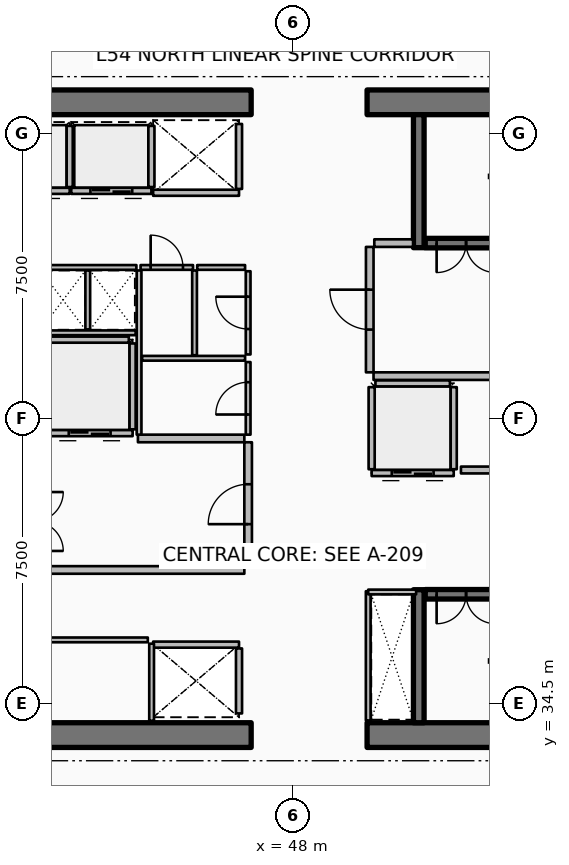
"""IFC4 building model, lengths in metres.
Left out: names, types, materials, properties, quantities, classifications, styles, units other than length and angle.
Written with IfcOpenShell. Run it as: python <this file> out.ifc"""

import sys

from ifc_helpers import new_model, si_unit, direction, frame, frame_2d, origin, place, context, subcontext, project, spatial, rectangle, extrude, element, fill, save


model = new_model("IFC4")
c1 = context("Model", 3, precision=1e-05, world=origin(), true_north=direction((0.0, 1.0)))
c2 = subcontext(c1, "Body", "Model", "MODEL_VIEW")
j1 = project(units=[si_unit("LENGTHUNIT", "METRE"), si_unit("PLANEANGLEUNIT", "RADIAN")], contexts=[c1])
p1 = place(None, origin())
s1 = spatial("IfcSite", under=j1, at=p1, CompositionType="ELEMENT")
p2 = place(p1, origin())
s2 = spatial("IfcBuilding", under=s1, at=p2, CompositionType="ELEMENT")
p3 = place(p2, frame((0.0, 0.0, 214.05)))
s3 = spatial("IfcBuildingStorey", under=s2, at=p3, CompositionType="ELEMENT", Elevation=214.05)
for number, where, z_axis, x_axis in (
    (1, (37.15, 33.675, 0.0), (0.0, 0.0, 1.0), (1.0, 0.0, 0.0)),
    (2, (49.95, 33.675, 0.0), (0.0, 0.0, 1.0), (1.0, 0.0, 0.0)),
    (3, (37.15, 50.325, 0.0), (0.0, 0.0, 1.0), (1.0, 0.0, 0.0)),
    (4, (49.95, 50.325, 0.0), (0.0, 0.0, 1.0), (1.0, 0.0, 0.0)),
):
    element("IfcWall", number, at=place(p3, frame(where, z_axis=z_axis, x_axis=x_axis)), inside=s3, PredefinedType="SHEAR", context=c2, shape_type="SweptSolid", body=[
        extrude(rectangle(XDim=9.75, YDim=0.65, at=frame_2d((4.875, 0.0))), origin(), (0.0, 0.0, 1.0), 3.75),
    ])
for number, where, z_axis, x_axis in (
    (5, (51.31, 46.5, 0.0), (0.0, 0.0, 1.0), (0.0, 1.0, 0.0)),
    (6, (51.31, 34.0, 0.0), (0.0, 0.0, 1.0), (0.0, 1.0, 0.0)),
):
    element("IfcWall", number, at=place(p3, frame(where, z_axis=z_axis, x_axis=x_axis)), inside=s3, PredefinedType="SHEAR", context=c2, shape_type="SweptSolid", body=[
        extrude(rectangle(XDim=3.5, YDim=0.28, at=frame_2d((1.75, 0.0))), origin(), (0.0, 0.0, 1.0), 3.75),
    ])
p4 = place(p3, frame((51.48, 46.62, 0.0), z_axis=(0.0, 0.0, 1.0), x_axis=(1.0, 0.0, 0.0)))
e7 = element("IfcWall", 7, at=p4, inside=s3, PredefinedType="SOLIDWALL", context=c2, shape_type="SweptSolid", body=[
    extrude(rectangle(XDim=7.54, YDim=0.25, at=frame_2d((3.77, 0.0))), origin(), (0.0, 0.0, 1.0), 3.5),
])
p5 = place(p4, frame((0.3, 0.0, 0.0)))
e8 = element("IfcOpeningElement", 8, at=p5, cuts=e7, PredefinedType="OPENING", context=c2, shape_type="SweptSolid", body=[
    extrude(rectangle(XDim=1.55, YDim=2.15, at=frame_2d((0.775, 1.075))), frame((0.0, 0.135, 0.0), z_axis=(0.0, -1.0, 0.0), x_axis=(1.0, 0.0, 0.0)), (0.0, 0.0, 1.0), 0.27),
])
p6 = place(p3, frame((51.48, 37.38, 0.0), z_axis=(0.0, 0.0, 1.0), x_axis=(1.0, 0.0, 0.0)))
e9 = element("IfcWall", 9, at=p6, inside=s3, PredefinedType="SOLIDWALL", context=c2, shape_type="SweptSolid", body=[
    extrude(rectangle(XDim=7.54, YDim=0.25, at=frame_2d((3.77, 0.0))), origin(), (0.0, 0.0, 1.0), 3.5),
])
p7 = place(p6, frame((0.3, 0.0, 0.0)))
e10 = element("IfcOpeningElement", 10, at=p7, cuts=e9, PredefinedType="OPENING", context=c2, shape_type="SweptSolid", body=[
    extrude(rectangle(XDim=1.55, YDim=2.15, at=frame_2d((0.775, 1.075))), frame((0.0, 0.135, 0.0), z_axis=(0.0, -1.0, 0.0), x_axis=(1.0, 0.0, 0.0)), (0.0, 0.0, 1.0), 0.27),
])
p8 = place(p3, frame((42.125, 47.995, 0.0), z_axis=(0.0, 0.0, 1.0), x_axis=(-1.0, 0.0, 0.0)))
e11 = element("IfcWall", 11, at=p8, inside=s3, PredefinedType="PARTITIONING", context=c2, shape_type="SweptSolid", body=[
    extrude(rectangle(XDim=2.11, YDim=0.16, at=frame_2d((1.055, 0.0))), origin(), (0.0, 0.0, 1.0), 3.5),
])
p9 = place(p8, frame((0.505, 0.0, 0.0)))
e12 = element("IfcOpeningElement", 12, at=p9, cuts=e11, PredefinedType="OPENING", context=c2, shape_type="SweptSolid", body=[
    extrude(rectangle(XDim=1.1, YDim=2.1, at=frame_2d((0.55, 1.05))), frame((0.0, 0.09, 0.0), z_axis=(0.0, -1.0, 0.0), x_axis=(1.0, 0.0, 0.0)), (0.0, 0.0, 1.0), 0.18),
])
p10 = place(p3, frame((42.125, 48.095, 0.0), z_axis=(0.0, 0.0, 1.0), x_axis=(0.0, 1.0, 0.0)))
e13 = element("IfcWall", 13, at=p10, inside=s3, PredefinedType="PARTITIONING", context=c2, shape_type="SweptSolid", body=[
    extrude(rectangle(XDim=1.61, YDim=0.16, at=frame_2d((0.805, 0.0))), origin(), (0.0, 0.0, 1.0), 3.5),
])
p11 = place(p3, frame((44.275, 47.995, 0.0), z_axis=(0.0, 0.0, 1.0), x_axis=(-1.0, 0.0, 0.0)))
e14 = element("IfcWall", 14, at=p11, inside=s3, PredefinedType="PARTITIONING", context=c2, shape_type="SweptSolid", body=[
    extrude(rectangle(XDim=2.11, YDim=0.16, at=frame_2d((1.055, 0.0))), origin(), (0.0, 0.0, 1.0), 3.5),
])
p12 = place(p11, frame((0.505, 0.0, 0.0)))
e15 = element("IfcOpeningElement", 15, at=p12, cuts=e14, PredefinedType="OPENING", context=c2, shape_type="SweptSolid", body=[
    extrude(rectangle(XDim=1.1, YDim=2.1, at=frame_2d((0.55, 1.05))), frame((0.0, 0.09, 0.0), z_axis=(0.0, -1.0, 0.0), x_axis=(1.0, 0.0, 0.0)), (0.0, 0.0, 1.0), 0.18),
])
p13 = place(p3, frame((44.275, 48.095, 0.0), z_axis=(0.0, 0.0, 1.0), x_axis=(0.0, 1.0, 0.0)))
e16 = element("IfcWall", 16, at=p13, inside=s3, PredefinedType="PARTITIONING", context=c2, shape_type="SweptSolid", body=[
    extrude(rectangle(XDim=1.61, YDim=0.16, at=frame_2d((0.805, 0.0))), origin(), (0.0, 0.0, 1.0), 3.5),
])
p14 = place(p3, frame((46.58, 47.945, 0.0), z_axis=(0.0, 0.0, 1.0), x_axis=(-1.0, 0.0, 0.0)))
e17 = element("IfcWall", 17, at=p14, inside=s3, PredefinedType="PARTITIONING", context=c2, shape_type="SweptSolid", body=[
    extrude(rectangle(XDim=2.26, YDim=0.16, at=frame_2d((1.13, 0.0))), origin(), (0.0, 0.0, 1.0), 3.5),
])
p15 = place(p3, frame((46.58, 48.045, 0.0), z_axis=(0.0, 0.0, 1.0), x_axis=(0.0, 1.0, 0.0)))
e18 = element("IfcWall", 18, at=p15, inside=s3, PredefinedType="PARTITIONING", context=c2, shape_type="SweptSolid", body=[
    extrude(rectangle(XDim=1.71, YDim=0.16, at=frame_2d((0.855, 0.0))), origin(), (0.0, 0.0, 1.0), 3.5),
])
p16 = place(p3, frame((44.32, 36.055, 0.0), z_axis=(0.0, 0.0, 1.0), x_axis=(1.0, 0.0, 0.0)))
e19 = element("IfcWall", 19, at=p16, inside=s3, PredefinedType="PARTITIONING", context=c2, shape_type="SweptSolid", body=[
    extrude(rectangle(XDim=2.26, YDim=0.16, at=frame_2d((1.13, 0.0))), origin(), (0.0, 0.0, 1.0), 3.5),
])
p17 = place(p3, frame((46.58, 34.245, 0.0), z_axis=(0.0, 0.0, 1.0), x_axis=(0.0, 1.0, 0.0)))
e20 = element("IfcWall", 20, at=p17, inside=s3, PredefinedType="PARTITIONING", context=c2, shape_type="SweptSolid", body=[
    extrude(rectangle(XDim=1.71, YDim=0.16, at=frame_2d((0.855, 0.0))), origin(), (0.0, 0.0, 1.0), 3.5),
])
p18 = place(p3, frame((43.78, 41.62, 0.0), z_axis=(0.0, 0.0, 1.0), x_axis=(-1.0, 0.0, 0.0)))
e21 = element("IfcWall", 21, at=p18, inside=s3, PredefinedType="PARTITIONING", context=c2, shape_type="SweptSolid", body=[
    extrude(rectangle(XDim=2.26, YDim=0.16, at=frame_2d((1.13, 0.0))), origin(), (0.0, 0.0, 1.0), 3.5),
])
p19 = place(p18, frame((0.58, 0.0, 0.0)))
e22 = element("IfcOpeningElement", 22, at=p19, cuts=e21, PredefinedType="OPENING", context=c2, shape_type="SweptSolid", body=[
    extrude(rectangle(XDim=1.1, YDim=2.1, at=frame_2d((0.55, 1.05))), frame((0.0, 0.09, 0.0), z_axis=(0.0, -1.0, 0.0), x_axis=(1.0, 0.0, 0.0)), (0.0, 0.0, 1.0), 0.18),
])
p20 = place(p3, frame((43.78, 41.72, 0.0), z_axis=(0.0, 0.0, 1.0), x_axis=(0.0, 1.0, 0.0)))
e23 = element("IfcWall", 23, at=p20, inside=s3, PredefinedType="PARTITIONING", context=c2, shape_type="SweptSolid", body=[
    extrude(rectangle(XDim=2.26, YDim=0.16, at=frame_2d((1.13, 0.0))), origin(), (0.0, 0.0, 1.0), 3.5),
])
p21 = place(p3, frame((41.62, 44.08, 0.0), z_axis=(0.0, 0.0, 1.0), x_axis=(1.0, 0.0, 0.0)))
e24 = element("IfcWall", 24, at=p21, inside=s3, PredefinedType="PARTITIONING", context=c2, shape_type="SweptSolid", body=[
    extrude(rectangle(XDim=2.06, YDim=0.16, at=frame_2d((1.03, 0.0))), origin(), (0.0, 0.0, 1.0), 3.5),
])
p22 = place(p3, frame((52.23, 40.57, 0.0), z_axis=(0.0, 0.0, 1.0), x_axis=(-1.0, 0.0, 0.0)))
e25 = element("IfcWall", 25, at=p22, inside=s3, PredefinedType="PARTITIONING", context=c2, shape_type="SweptSolid", body=[
    extrude(rectangle(XDim=2.16, YDim=0.16, at=frame_2d((1.08, 0.0))), origin(), (0.0, 0.0, 1.0), 3.5),
])
p23 = place(p22, frame((0.53, 0.0, 0.0)))
e26 = element("IfcOpeningElement", 26, at=p23, cuts=e25, PredefinedType="OPENING", context=c2, shape_type="SweptSolid", body=[
    extrude(rectangle(XDim=1.1, YDim=2.1, at=frame_2d((0.55, 1.05))), frame((0.0, 0.09, 0.0), z_axis=(0.0, -1.0, 0.0), x_axis=(1.0, 0.0, 0.0)), (0.0, 0.0, 1.0), 0.18),
])
for number, where, z_axis, x_axis in (
    (27, (52.23, 40.67, 0.0), (0.0, 0.0, 1.0), (0.0, 1.0, 0.0)),
    (28, (50.07, 40.67, 0.0), (0.0, 0.0, 1.0), (0.0, 1.0, 0.0)),
):
    element("IfcWall", number, at=place(p3, frame(where, z_axis=z_axis, x_axis=x_axis)), inside=s3, PredefinedType="PARTITIONING", context=c2, shape_type="SweptSolid", body=[
        extrude(rectangle(XDim=2.16, YDim=0.16, at=frame_2d((1.08, 0.0))), origin(), (0.0, 0.0, 1.0), 3.5),
    ])
p24 = place(p3, frame((50.17, 42.93, 0.0), z_axis=(0.0, 0.0, 1.0), x_axis=(1.0, 0.0, 0.0)))
e29 = element("IfcWall", 29, at=p24, inside=s3, PredefinedType="PARTITIONING", context=c2, shape_type="SweptSolid", body=[
    extrude(rectangle(XDim=1.96, YDim=0.16, at=frame_2d((0.98, 0.0))), origin(), (0.0, 0.0, 1.0), 3.5),
])
p25 = place(p3, frame((52.42, 40.65, 0.0), z_axis=(0.0, 0.0, 1.0), x_axis=(1.0, 0.0, 0.0)))
e30 = element("IfcWall", 30, at=p25, inside=s3, PredefinedType="PARTITIONING", context=c2, shape_type="SweptSolid", body=[
    extrude(rectangle(XDim=6.5, YDim=0.18, at=frame_2d((3.25, 0.0))), origin(), (0.0, 0.0, 1.0), 3.5),
])
p26 = place(p25, frame((2.825, 0.0, 0.0)))
e31 = element("IfcOpeningElement", 31, at=p26, cuts=e30, PredefinedType="OPENING", context=c2, shape_type="SweptSolid", body=[
    extrude(rectangle(XDim=0.85, YDim=2.06, at=frame_2d((0.425, 1.03))), frame((0.0, 0.1, 0.0), z_axis=(0.0, -1.0, 0.0), x_axis=(1.0, 0.0, 0.0)), (0.0, 0.0, 1.0), 0.2),
])
p27 = place(p3, frame((44.28, 34.05, 0.0), z_axis=(0.0, 0.0, 1.0), x_axis=(0.0, 1.0, 0.0)))
e32 = element("IfcWall", 32, at=p27, inside=s3, PredefinedType="PARTITIONING", context=c2, shape_type="SweptSolid", body=[
    extrude(rectangle(XDim=2.03, YDim=0.125, at=frame_2d((1.015, 0.0))), origin(), (0.0, 0.0, 1.0), 2.94),
])
p28 = place(p3, frame((37.92, 36.18, 0.0), z_axis=(0.0, 0.0, 1.0), x_axis=(1.0, 0.0, 0.0)))
e33 = element("IfcWall", 33, at=p28, inside=s3, PredefinedType="PARTITIONING", context=c2, shape_type="SweptSolid", body=[
    extrude(rectangle(XDim=6.26, YDim=0.125, at=frame_2d((3.13, 0.0))), origin(), (0.0, 0.0, 1.0), 2.94),
])
p29 = place(p28, frame((2.705, 0.0, 0.0)))
e34 = element("IfcOpeningElement", 34, at=p29, cuts=e33, PredefinedType="OPENING", context=c2, shape_type="SweptSolid", body=[
    extrude(rectangle(XDim=0.85, YDim=2.06, at=frame_2d((0.425, 1.03))), frame((0.0, 0.073, 0.0), z_axis=(0.0, -1.0, 0.0), x_axis=(1.0, 0.0, 0.0)), (0.0, 0.0, 1.0), 0.145),
])
p30 = place(p3, frame((41.35, 38.02, 0.0), z_axis=(0.0, 0.0, 1.0), x_axis=(1.0, 0.0, 0.0)))
e35 = element("IfcWall", 35, at=p30, inside=s3, PredefinedType="PARTITIONING", context=c2, shape_type="SweptSolid", body=[
    extrude(rectangle(XDim=5.37, YDim=0.2, at=frame_2d((2.685, 0.0))), origin(), (0.0, 0.0, 1.0), 3.5),
])
p31 = place(p3, frame((43.92, 41.48, 0.0), z_axis=(0.0, 0.0, 1.0), x_axis=(1.0, 0.0, 0.0)))
e36 = element("IfcWall", 36, at=p31, inside=s3, PredefinedType="PARTITIONING", context=c2, shape_type="SweptSolid", body=[
    extrude(rectangle(XDim=2.8, YDim=0.2, at=frame_2d((1.4, 0.0))), origin(), (0.0, 0.0, 1.0), 3.5),
])
p32 = place(p3, frame((46.82, 38.12, 0.0), z_axis=(0.0, 0.0, 1.0), x_axis=(0.0, 1.0, 0.0)))
e37 = element("IfcWall", 37, at=p32, inside=s3, PredefinedType="PARTITIONING", context=c2, shape_type="SweptSolid", body=[
    extrude(rectangle(XDim=3.26, YDim=0.2, at=frame_2d((1.63, 0.0))), origin(), (0.0, 0.0, 1.0), 3.5),
])
p33 = place(p32, frame((1.105, 0.0, 0.0)))
e38 = element("IfcOpeningElement", 38, at=p33, cuts=e37, PredefinedType="OPENING", context=c2, shape_type="SweptSolid", body=[
    extrude(rectangle(XDim=1.05, YDim=2.1, at=frame_2d((0.525, 1.05))), frame((0.0, 0.11, 0.0), z_axis=(0.0, -1.0, 0.0), x_axis=(1.0, 0.0, 0.0)), (0.0, 0.0, 1.0), 0.22),
])
p34 = place(p3, frame((50.12, 43.12, 0.0), z_axis=(0.0, 0.0, 1.0), x_axis=(1.0, 0.0, 0.0)))
e39 = element("IfcWall", 39, at=p34, inside=s3, PredefinedType="PARTITIONING", context=c2, shape_type="SweptSolid", body=[
    extrude(rectangle(XDim=8.88, YDim=0.2, at=frame_2d((4.44, 0.0))), origin(), (0.0, 0.0, 1.0), 3.5),
])
p35 = place(p3, frame((50.14, 46.62, 0.0), z_axis=(0.0, 0.0, 1.0), x_axis=(1.0, 0.0, 0.0)))
e40 = element("IfcWall", 40, at=p35, inside=s3, PredefinedType="PARTITIONING", context=c2, shape_type="SweptSolid", body=[
    extrude(rectangle(XDim=1.02, YDim=0.2, at=frame_2d((0.51, 0.0))), origin(), (0.0, 0.0, 1.0), 3.5),
])
p36 = place(p3, frame((50.02, 43.22, 0.0), z_axis=(0.0, 0.0, 1.0), x_axis=(0.0, 1.0, 0.0)))
e41 = element("IfcWall", 41, at=p36, inside=s3, PredefinedType="PARTITIONING", context=c2, shape_type="SweptSolid", body=[
    extrude(rectangle(XDim=3.3, YDim=0.2, at=frame_2d((1.65, 0.0))), origin(), (0.0, 0.0, 1.0), 3.5),
])
p37 = place(p36, frame((1.125, 0.0, 0.0)))
e42 = element("IfcOpeningElement", 42, at=p37, cuts=e41, PredefinedType="OPENING", context=c2, shape_type="SweptSolid", body=[
    extrude(rectangle(XDim=1.05, YDim=2.1, at=frame_2d((0.525, 1.05))), frame((0.0, 0.11, 0.0), z_axis=(0.0, -1.0, 0.0), x_axis=(1.0, 0.0, 0.0)), (0.0, 0.0, 1.0), 0.22),
])
p38 = place(p3, frame((41.36, 44.26, 0.0), z_axis=(0.0, 0.0, 1.0), x_axis=(1.0, 0.0, 0.0)))
e43 = element("IfcWall", 43, at=p38, inside=s3, PredefinedType="PARTITIONING", context=c2, shape_type="SweptSolid", body=[
    extrude(rectangle(XDim=2.5, YDim=0.125, at=frame_2d((1.25, 0.0))), origin(), (0.0, 0.0, 1.0), 2.94),
])
p39 = place(p3, frame((42.6, 44.35, 0.0), z_axis=(0.0, 0.0, 1.0), x_axis=(0.0, 1.0, 0.0)))
e44 = element("IfcWall", 44, at=p39, inside=s3, PredefinedType="PARTITIONING", context=c2, shape_type="SweptSolid", body=[
    extrude(rectangle(XDim=1.55, YDim=0.125, at=frame_2d((0.775, 0.0))), origin(), (0.0, 0.0, 1.0), 2.94),
])
p40 = place(p3, frame((49.98, 34.06, 0.0), z_axis=(0.0, 0.0, 1.0), x_axis=(0.0, 1.0, 0.0)))
e45 = element("IfcWall", 45, at=p40, inside=s3, PredefinedType="PARTITIONING", context=c2, shape_type="SweptSolid", body=[
    extrude(rectangle(XDim=3.4, YDim=0.125, at=frame_2d((1.7, 0.0))), origin(), (0.0, 0.0, 1.0), 2.94),
])
p41 = place(p3, frame((49.98, 37.44, 0.0), z_axis=(0.0, 0.0, 1.0), x_axis=(1.0, 0.0, 0.0)))
e46 = element("IfcWall", 46, at=p41, inside=s3, PredefinedType="PARTITIONING", context=c2, shape_type="SweptSolid", body=[
    extrude(rectangle(XDim=1.26, YDim=0.125, at=frame_2d((0.63, 0.0))), origin(), (0.0, 0.0, 1.0), 2.94),
])
p42 = place(p3, frame((43.95, 41.58, 0.0), z_axis=(0.0, 0.0, 1.0), x_axis=(0.0, 1.0, 0.0)))
e47 = element("IfcWall", 47, at=p42, inside=s3, PredefinedType="PARTITIONING", context=c2, shape_type="SweptSolid", body=[
    extrude(rectangle(XDim=4.32, YDim=0.125, at=frame_2d((2.16, 0.0))), origin(), (0.0, 0.0, 1.0), 2.94),
])
p43 = place(p3, frame((44.03, 43.59, 0.0), z_axis=(0.0, 0.0, 1.0), x_axis=(1.0, 0.0, 0.0)))
e48 = element("IfcWall", 48, at=p43, inside=s3, PredefinedType="PARTITIONING", context=c2, shape_type="SweptSolid", body=[
    extrude(rectangle(XDim=2.71, YDim=0.125, at=frame_2d((1.355, 0.0))), origin(), (0.0, 0.0, 1.0), 2.94),
])
p44 = place(p3, frame((45.41, 43.67, 0.0), z_axis=(0.0, 0.0, 1.0), x_axis=(0.0, 1.0, 0.0)))
e49 = element("IfcWall", 49, at=p44, inside=s3, PredefinedType="PARTITIONING", context=c2, shape_type="SweptSolid", body=[
    extrude(rectangle(XDim=2.23, YDim=0.125, at=frame_2d((1.115, 0.0))), origin(), (0.0, 0.0, 1.0), 2.94),
])
p45 = place(p3, frame((46.82, 41.58, 0.0), z_axis=(0.0, 0.0, 1.0), x_axis=(0.0, 1.0, 0.0)))
e50 = element("IfcWall", 50, at=p45, inside=s3, PredefinedType="PARTITIONING", context=c2, shape_type="SweptSolid", body=[
    extrude(rectangle(XDim=1.91, YDim=0.125, at=frame_2d((0.955, 0.0))), origin(), (0.0, 0.0, 1.0), 2.94),
])
p46 = place(p45, frame((0.53, 0.0, 0.0)))
e51 = element("IfcOpeningElement", 51, at=p46, cuts=e50, PredefinedType="OPENING", context=c2, shape_type="SweptSolid", body=[
    extrude(rectangle(XDim=0.85, YDim=2.06, at=frame_2d((0.425, 1.03))), frame((0.0, 0.073, 0.0), z_axis=(0.0, -1.0, 0.0), x_axis=(1.0, 0.0, 0.0)), (0.0, 0.0, 1.0), 0.145),
])
p47 = place(p3, frame((46.82, 43.69, 0.0), z_axis=(0.0, 0.0, 1.0), x_axis=(0.0, 1.0, 0.0)))
e52 = element("IfcWall", 52, at=p47, inside=s3, PredefinedType="PARTITIONING", context=c2, shape_type="SweptSolid", body=[
    extrude(rectangle(XDim=2.19, YDim=0.125, at=frame_2d((1.095, 0.0))), origin(), (0.0, 0.0, 1.0), 2.94),
])
p48 = place(p47, frame((0.67, 0.0, 0.0)))
e53 = element("IfcOpeningElement", 53, at=p48, cuts=e52, PredefinedType="OPENING", context=c2, shape_type="SweptSolid", body=[
    extrude(rectangle(XDim=0.85, YDim=2.06, at=frame_2d((0.425, 1.03))), frame((0.0, 0.073, 0.0), z_axis=(0.0, -1.0, 0.0), x_axis=(1.0, 0.0, 0.0)), (0.0, 0.0, 1.0), 0.145),
])
p49 = place(p3, frame((41.35, 45.98, 0.0), z_axis=(0.0, 0.0, 1.0), x_axis=(1.0, 0.0, 0.0)))
e54 = element("IfcWall", 54, at=p49, inside=s3, PredefinedType="PARTITIONING", context=c2, shape_type="SweptSolid", body=[
    extrude(rectangle(XDim=2.53, YDim=0.125, at=frame_2d((1.265, 0.0))), origin(), (0.0, 0.0, 1.0), 2.94),
])
p50 = place(p3, frame((43.99, 45.98, 0.0), z_axis=(0.0, 0.0, 1.0), x_axis=(1.0, 0.0, 0.0)))
e55 = element("IfcWall", 55, at=p50, inside=s3, PredefinedType="PARTITIONING", context=c2, shape_type="SweptSolid", body=[
    extrude(rectangle(XDim=1.38, YDim=0.125, at=frame_2d((0.69, 0.0))), origin(), (0.0, 0.0, 1.0), 2.94),
])
p51 = place(p50, frame((0.265, 0.0, 0.0)))
e56 = element("IfcOpeningElement", 56, at=p51, cuts=e55, PredefinedType="OPENING", context=c2, shape_type="SweptSolid", body=[
    extrude(rectangle(XDim=0.85, YDim=2.06, at=frame_2d((0.425, 1.03))), frame((0.0, 0.073, 0.0), z_axis=(0.0, -1.0, 0.0), x_axis=(1.0, 0.0, 0.0)), (0.0, 0.0, 1.0), 0.145),
])
p52 = place(p3, frame((45.48, 45.98, 0.0), z_axis=(0.0, 0.0, 1.0), x_axis=(1.0, 0.0, 0.0)))
e57 = element("IfcWall", 57, at=p52, inside=s3, PredefinedType="PARTITIONING", context=c2, shape_type="SweptSolid", body=[
    extrude(rectangle(XDim=1.26, YDim=0.125, at=frame_2d((0.63, 0.0))), origin(), (0.0, 0.0, 1.0), 2.94),
])
p53 = place(p5, origin())
e58 = element("IfcDoor", 58, at=p53, inside=s3, OperationType="DOUBLE_DOOR_SINGLE_SWING", PredefinedType="DOOR", context=c2, shape_type="SweptSolid", body=[
    extrude(rectangle(XDim=1.55, YDim=2.15, at=frame_2d((0.775, 1.075))), frame((0.0, 0.025, 0.0), z_axis=(0.0, -1.0, 0.0), x_axis=(1.0, 0.0, 0.0)), (0.0, 0.0, 1.0), 0.05),
])
fill(e8, e58)
p54 = place(p7, origin())
e59 = element("IfcDoor", 59, at=p54, inside=s3, OperationType="DOUBLE_DOOR_SINGLE_SWING", PredefinedType="DOOR", context=c2, shape_type="SweptSolid", body=[
    extrude(rectangle(XDim=1.55, YDim=2.15, at=frame_2d((0.775, 1.075))), frame((0.0, 0.025, 0.0), z_axis=(0.0, -1.0, 0.0), x_axis=(1.0, 0.0, 0.0)), (0.0, 0.0, 1.0), 0.05),
])
fill(e10, e59)
p55 = place(p12, origin())
e60 = element("IfcDoor", 60, at=p55, inside=s3, OperationType="DOUBLE_DOOR_SLIDING", PredefinedType="DOOR", context=c2, shape_type="SweptSolid", body=[
    extrude(rectangle(XDim=1.1, YDim=2.1, at=frame_2d((0.55, 1.05))), frame((0.0, 0.025, 0.0), z_axis=(0.0, -1.0, 0.0), x_axis=(1.0, 0.0, 0.0)), (0.0, 0.0, 1.0), 0.05),
])
fill(e15, e60)
p56 = place(p19, origin())
e61 = element("IfcDoor", 61, at=p56, inside=s3, OperationType="DOUBLE_DOOR_SLIDING", PredefinedType="DOOR", context=c2, shape_type="SweptSolid", body=[
    extrude(rectangle(XDim=1.1, YDim=2.1, at=frame_2d((0.55, 1.05))), frame((0.0, 0.025, 0.0), z_axis=(0.0, -1.0, 0.0), x_axis=(1.0, 0.0, 0.0)), (0.0, 0.0, 1.0), 0.05),
])
fill(e22, e61)
p57 = place(p23, origin())
e62 = element("IfcDoor", 62, at=p57, inside=s3, OperationType="DOUBLE_DOOR_SLIDING", PredefinedType="DOOR", context=c2, shape_type="SweptSolid", body=[
    extrude(rectangle(XDim=1.1, YDim=2.1, at=frame_2d((0.55, 1.05))), frame((0.0, 0.025, 0.0), z_axis=(0.0, -1.0, 0.0), x_axis=(1.0, 0.0, 0.0)), (0.0, 0.0, 1.0), 0.05),
])
fill(e26, e62)
p58 = place(p33, origin())
e63 = element("IfcDoor", 63, at=p58, inside=s3, OperationType="SINGLE_SWING_LEFT", PredefinedType="DOOR", context=c2, shape_type="SweptSolid", body=[
    extrude(rectangle(XDim=1.05, YDim=2.1, at=frame_2d((0.525, 1.05))), frame((0.0, 0.025, 0.0), z_axis=(0.0, -1.0, 0.0), x_axis=(1.0, 0.0, 0.0)), (0.0, 0.0, 1.0), 0.05),
])
fill(e38, e63)
p59 = place(p37, origin())
e64 = element("IfcDoor", 64, at=p59, inside=s3, OperationType="SINGLE_SWING_RIGHT", PredefinedType="DOOR", context=c2, shape_type="SweptSolid", body=[
    extrude(rectangle(XDim=1.05, YDim=2.1, at=frame_2d((0.525, 1.05))), frame((0.0, 0.025, 0.0), z_axis=(0.0, -1.0, 0.0), x_axis=(1.0, 0.0, 0.0)), (0.0, 0.0, 1.0), 0.05),
])
fill(e42, e64)
p60 = place(p46, origin())
e65 = element("IfcDoor", 65, at=p60, inside=s3, OperationType="SINGLE_SWING_LEFT", PredefinedType="DOOR", context=c2, shape_type="SweptSolid", body=[
    extrude(rectangle(XDim=0.85, YDim=2.06, at=frame_2d((0.425, 1.03))), frame((0.0, 0.025, 0.0), z_axis=(0.0, -1.0, 0.0), x_axis=(1.0, 0.0, 0.0)), (0.0, 0.0, 1.0), 0.05),
])
fill(e51, e65)
p61 = place(p48, origin())
e66 = element("IfcDoor", 66, at=p61, inside=s3, OperationType="SINGLE_SWING_RIGHT", PredefinedType="DOOR", context=c2, shape_type="SweptSolid", body=[
    extrude(rectangle(XDim=0.85, YDim=2.06, at=frame_2d((0.425, 1.03))), frame((0.0, 0.025, 0.0), z_axis=(0.0, -1.0, 0.0), x_axis=(1.0, 0.0, 0.0)), (0.0, 0.0, 1.0), 0.05),
])
fill(e53, e66)
p62 = place(p51, origin())
e67 = element("IfcDoor", 67, at=p62, inside=s3, OperationType="SINGLE_SWING_LEFT", PredefinedType="DOOR", context=c2, shape_type="SweptSolid", body=[
    extrude(rectangle(XDim=0.85, YDim=2.06, at=frame_2d((0.425, 1.03))), frame((0.0, 0.025, 0.0), z_axis=(0.0, -1.0, 0.0), x_axis=(1.0, 0.0, 0.0)), (0.0, 0.0, 1.0), 0.05),
])
fill(e56, e67)
save(model, sys.argv[1])
